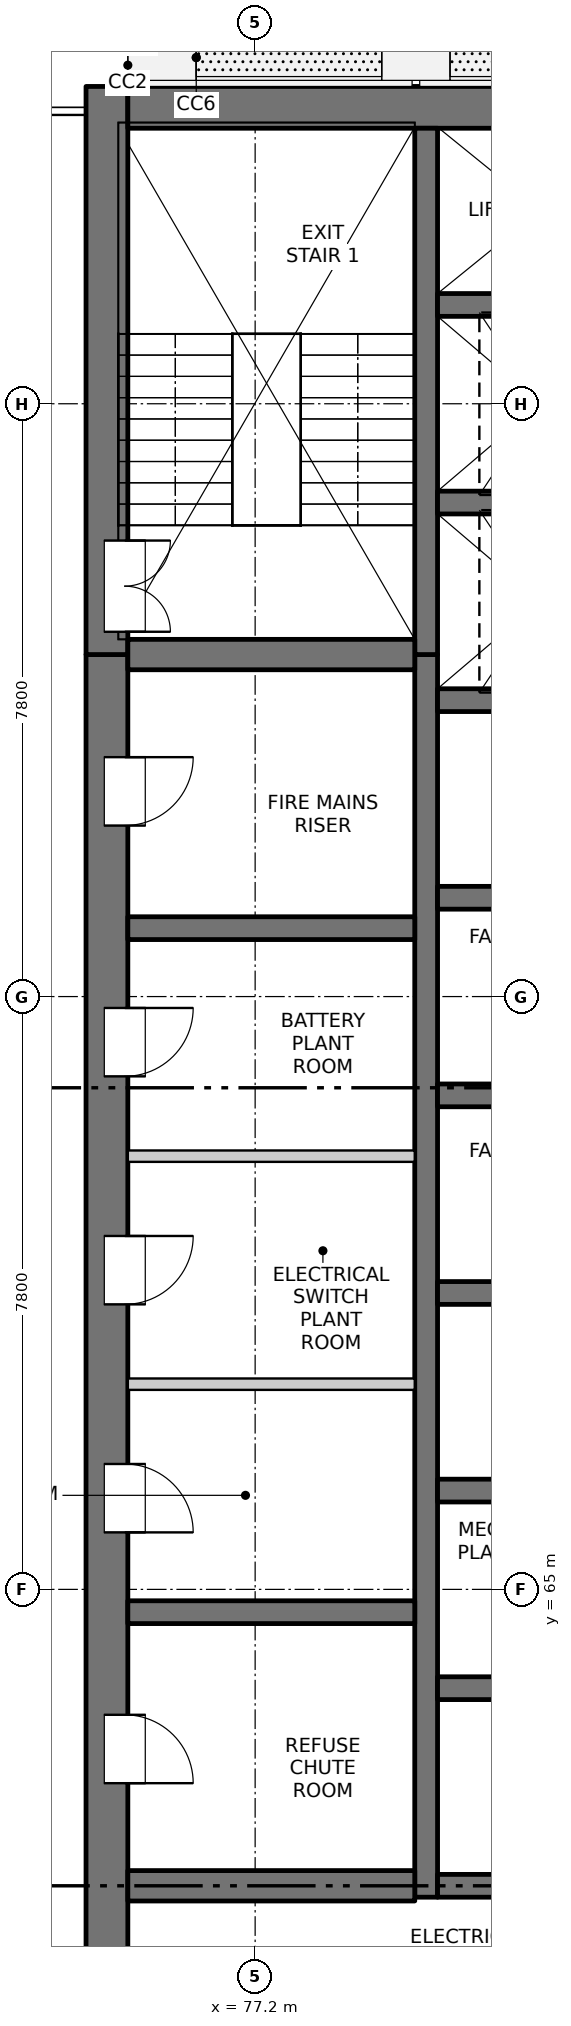
"""IFC4 building model, lengths in metres.
Left out: names, types, materials, properties, quantities, classifications, styles, units other than length and angle.
Written with IfcOpenShell. Run it as: python <this file> out.ifc"""

import sys

from ifc_helpers import new_model, si_unit, direction, frame, frame_2d, origin, place, context, subcontext, project, spatial, rectangle, extrude, element, fill, save


model = new_model("IFC4")
c1 = context("Model", 3, precision=1e-05, world=origin(), true_north=direction((0.0, 1.0)))
c2 = subcontext(c1, "Body", "Model", "MODEL_VIEW")
j1 = project(units=[si_unit("LENGTHUNIT", "METRE"), si_unit("PLANEANGLEUNIT", "RADIAN")], contexts=[c1])
p1 = place(None, origin())
s1 = spatial("IfcSite", under=j1, at=p1, CompositionType="ELEMENT")
p2 = place(p1, origin())
s2 = spatial("IfcBuilding", under=s1, at=p2, CompositionType="ELEMENT")
p3 = place(p2, frame((0.0, 0.0, 172.4)))
s3 = spatial("IfcBuildingStorey", under=s2, at=p3, CompositionType="ELEMENT", Elevation=172.4)
p4 = place(p3, frame((75.25, 54.975, -0.3), z_axis=(0.0, 0.0, 1.0), x_axis=(0.0, 1.0, 0.0)))
e1 = element("IfcWall", 1, at=p4, inside=s3, PredefinedType="SOLIDWALL", context=c2, shape_type="SweptSolid", body=[
    extrude(rectangle(XDim=22.325, YDim=0.55, at=frame_2d((11.163, 0.0))), origin(), (0.0, 0.0, 1.0), 6.8),
])
p5 = place(p4, frame((7.475, 0.0, 0.3)))
e2 = element("IfcOpeningElement", 2, at=p5, cuts=e1, PredefinedType="OPENING", context=c2, shape_type="SweptSolid", body=[
    extrude(rectangle(XDim=0.9, YDim=2.1, at=frame_2d((0.45, 1.05))), frame((0.0, 0.285, 0.0), z_axis=(0.0, -1.0, 0.0), x_axis=(1.0, 0.0, 0.0)), (0.0, 0.0, 1.0), 0.57),
])
p6 = place(p4, frame((10.775, 0.0, 0.3)))
e3 = element("IfcOpeningElement", 3, at=p6, cuts=e1, PredefinedType="OPENING", context=c2, shape_type="SweptSolid", body=[
    extrude(rectangle(XDim=0.9, YDim=2.1, at=frame_2d((0.45, 1.05))), frame((0.0, 0.285, 0.0), z_axis=(0.0, -1.0, 0.0), x_axis=(1.0, 0.0, 0.0)), (0.0, 0.0, 1.0), 0.57),
])
p7 = place(p4, frame((13.775, 0.0, 0.3)))
e4 = element("IfcOpeningElement", 4, at=p7, cuts=e1, PredefinedType="OPENING", context=c2, shape_type="SweptSolid", body=[
    extrude(rectangle(XDim=0.9, YDim=2.1, at=frame_2d((0.45, 1.05))), frame((0.0, 0.285, 0.0), z_axis=(0.0, -1.0, 0.0), x_axis=(1.0, 0.0, 0.0)), (0.0, 0.0, 1.0), 0.57),
])
p8 = place(p4, frame((16.775, 0.0, 0.3)))
e5 = element("IfcOpeningElement", 5, at=p8, cuts=e1, PredefinedType="OPENING", context=c2, shape_type="SweptSolid", body=[
    extrude(rectangle(XDim=0.9, YDim=2.1, at=frame_2d((0.45, 1.05))), frame((0.0, 0.285, 0.0), z_axis=(0.0, -1.0, 0.0), x_axis=(1.0, 0.0, 0.0)), (0.0, 0.0, 1.0), 0.57),
])
p9 = place(p4, frame((20.075, 0.0, 0.3)))
e6 = element("IfcOpeningElement", 6, at=p9, cuts=e1, PredefinedType="OPENING", context=c2, shape_type="SweptSolid", body=[
    extrude(rectangle(XDim=0.9, YDim=2.1, at=frame_2d((0.45, 1.05))), frame((0.0, 0.285, 0.0), z_axis=(0.0, -1.0, 0.0), x_axis=(1.0, 0.0, 0.0)), (0.0, 0.0, 1.0), 0.57),
])
p10 = place(p3, frame((75.25, 77.3, -0.3), z_axis=(0.0, 0.0, 1.0), x_axis=(0.0, 1.0, 0.0)))
e7 = element("IfcWall", 7, at=p10, inside=s3, PredefinedType="SOLIDWALL", context=c2, shape_type="SweptSolid", body=[
    extrude(rectangle(XDim=7.475, YDim=0.55, at=frame_2d((3.737, 0.0))), origin(), (0.0, 0.0, 1.0), 6.8),
])
p11 = place(p10, frame((0.3, 0.0, 0.3)))
e8 = element("IfcOpeningElement", 8, at=p11, cuts=e7, PredefinedType="OPENING", context=c2, shape_type="SweptSolid", body=[
    extrude(rectangle(XDim=1.2, YDim=2.1, at=frame_2d((0.6, 1.05))), frame((0.0, 0.285, 0.0), z_axis=(0.0, -1.0, 0.0), x_axis=(1.0, 0.0, 0.0)), (0.0, 0.0, 1.0), 0.57),
])
p12 = place(p3, frame((75.525, 84.5, -0.3), z_axis=(0.0, 0.0, 1.0), x_axis=(1.0, 0.0, 0.0)))
e9 = element("IfcWall", 9, at=p12, inside=s3, PredefinedType="SOLIDWALL", context=c2, shape_type="SweptSolid", body=[
    extrude(rectangle(XDim=18.95, YDim=0.55, at=frame_2d((9.475, 0.0))), origin(), (0.0, 0.0, 1.0), 6.8),
])
p13 = place(p3, frame((79.45, 60.95, -0.3), z_axis=(0.0, 0.0, 1.0), x_axis=(0.0, 1.0, 0.0)))
e10 = element("IfcWall", 10, at=p13, inside=s3, PredefinedType="SOLIDWALL", context=c2, shape_type="SweptSolid", body=[
    extrude(rectangle(XDim=16.35, YDim=0.3, at=frame_2d((8.175, 0.0))), origin(), (0.0, 0.0, 1.0), 6.8),
])
p14 = place(p3, frame((79.45, 77.3, -0.3), z_axis=(0.0, 0.0, 1.0), x_axis=(0.0, 1.0, 0.0)))
e11 = element("IfcWall", 11, at=p14, inside=s3, PredefinedType="SOLIDWALL", context=c2, shape_type="SweptSolid", body=[
    extrude(rectangle(XDim=6.925, YDim=0.3, at=frame_2d((3.462, 0.0))), origin(), (0.0, 0.0, 1.0), 6.8),
])
for number, where, z_axis, x_axis in (
    (12, (79.6, 61.1, -0.3), (0.0, 0.0, 1.0), (1.0, 0.0, 0.0)),
    (13, (79.6, 63.7, -0.3), (0.0, 0.0, 1.0), (1.0, 0.0, 0.0)),
    (14, (79.6, 66.3, -0.3), (0.0, 0.0, 1.0), (1.0, 0.0, 0.0)),
    (15, (79.6, 68.9, -0.3), (0.0, 0.0, 1.0), (1.0, 0.0, 0.0)),
    (16, (79.6, 71.5, -0.3), (0.0, 0.0, 1.0), (1.0, 0.0, 0.0)),
    (17, (79.6, 74.1, -0.3), (0.0, 0.0, 1.0), (1.0, 0.0, 0.0)),
    (18, (79.6, 76.7, -0.3), (0.0, 0.0, 1.0), (1.0, 0.0, 0.0)),
    (19, (79.6, 79.3, -0.3), (0.0, 0.0, 1.0), (1.0, 0.0, 0.0)),
    (20, (79.6, 81.9, -0.3), (0.0, 0.0, 1.0), (1.0, 0.0, 0.0)),
):
    element("IfcWall", number, at=place(p3, frame(where, z_axis=z_axis, x_axis=x_axis)), inside=s3, PredefinedType="SOLIDWALL", context=c2, shape_type="SweptSolid", body=[
        extrude(rectangle(XDim=3.0, YDim=0.3, at=frame_2d((1.5, 0.0))), origin(), (0.0, 0.0, 1.0), 6.8),
    ])
p15 = place(p3, frame((75.525, 61.1, -0.3), z_axis=(0.0, 0.0, 1.0), x_axis=(1.0, 0.0, 0.0)))
e21 = element("IfcWall", 21, at=p15, inside=s3, PredefinedType="SOLIDWALL", context=c2, shape_type="SweptSolid", body=[
    extrude(rectangle(XDim=3.775, YDim=0.4, at=frame_2d((1.888, 0.0))), origin(), (0.0, 0.0, 1.0), 6.8),
])
for number, where, z_axis, x_axis in (
    (22, (75.525, 64.7, -0.3), (0.0, 0.0, 1.0), (1.0, 0.0, 0.0)),
    (23, (75.525, 73.7, -0.3), (0.0, 0.0, 1.0), (1.0, 0.0, 0.0)),
):
    element("IfcWall", number, at=place(p3, frame(where, z_axis=z_axis, x_axis=x_axis)), inside=s3, PredefinedType="SOLIDWALL", context=c2, shape_type="SweptSolid", body=[
        extrude(rectangle(XDim=3.775, YDim=0.3, at=frame_2d((1.888, 0.0))), origin(), (0.0, 0.0, 1.0), 6.8),
    ])
p16 = place(p3, frame((75.525, 77.3, -0.3), z_axis=(0.0, 0.0, 1.0), x_axis=(1.0, 0.0, 0.0)))
e24 = element("IfcWall", 24, at=p16, inside=s3, PredefinedType="SOLIDWALL", context=c2, shape_type="SweptSolid", body=[
    extrude(rectangle(XDim=3.775, YDim=0.4, at=frame_2d((1.888, 0.0))), origin(), (0.0, 0.0, 1.0), 6.8),
])
for number, where, z_axis, x_axis in (
    (25, (75.525, 67.7, 0.0), (0.0, 0.0, 1.0), (1.0, 0.0, 0.0)),
    (26, (75.525, 70.7, 0.0), (0.0, 0.0, 1.0), (1.0, 0.0, 0.0)),
):
    element("IfcWall", number, at=place(p3, frame(where, z_axis=z_axis, x_axis=x_axis)), inside=s3, PredefinedType="PARTITIONING", context=c2, shape_type="SweptSolid", body=[
        extrude(rectangle(XDim=3.775, YDim=0.15, at=frame_2d((1.887, 0.0))), origin(), (0.0, 0.0, 1.0), 6.5),
    ])
p17 = place(p5, origin())
e27 = element("IfcDoor", 27, at=p17, inside=s3, OperationType="SINGLE_SWING_RIGHT", PredefinedType="DOOR", context=c2, shape_type="SweptSolid", body=[
    extrude(rectangle(XDim=0.9, YDim=2.1, at=frame_2d((0.45, 1.05))), frame((0.0, -0.21, 0.0), z_axis=(0.0, -1.0, 0.0), x_axis=(1.0, 0.0, 0.0)), (0.0, 0.0, 1.0), 0.05),
])
fill(e2, e27)
p18 = place(p6, origin())
e28 = element("IfcDoor", 28, at=p18, inside=s3, OperationType="SINGLE_SWING_RIGHT", PredefinedType="DOOR", context=c2, shape_type="SweptSolid", body=[
    extrude(rectangle(XDim=0.9, YDim=2.1, at=frame_2d((0.45, 1.05))), frame((0.0, -0.21, 0.0), z_axis=(0.0, -1.0, 0.0), x_axis=(1.0, 0.0, 0.0)), (0.0, 0.0, 1.0), 0.05),
])
fill(e3, e28)
p19 = place(p7, origin())
e29 = element("IfcDoor", 29, at=p19, inside=s3, OperationType="SINGLE_SWING_LEFT", PredefinedType="DOOR", context=c2, shape_type="SweptSolid", body=[
    extrude(rectangle(XDim=0.9, YDim=2.1, at=frame_2d((0.45, 1.05))), frame((0.0, -0.21, 0.0), z_axis=(0.0, -1.0, 0.0), x_axis=(1.0, 0.0, 0.0)), (0.0, 0.0, 1.0), 0.05),
])
fill(e4, e29)
p20 = place(p8, origin())
e30 = element("IfcDoor", 30, at=p20, inside=s3, OperationType="SINGLE_SWING_LEFT", PredefinedType="DOOR", context=c2, shape_type="SweptSolid", body=[
    extrude(rectangle(XDim=0.9, YDim=2.1, at=frame_2d((0.45, 1.05))), frame((0.0, -0.21, 0.0), z_axis=(0.0, -1.0, 0.0), x_axis=(1.0, 0.0, 0.0)), (0.0, 0.0, 1.0), 0.05),
])
fill(e5, e30)
p21 = place(p9, origin())
e31 = element("IfcDoor", 31, at=p21, inside=s3, OperationType="SINGLE_SWING_LEFT", PredefinedType="DOOR", context=c2, shape_type="SweptSolid", body=[
    extrude(rectangle(XDim=0.9, YDim=2.1, at=frame_2d((0.45, 1.05))), frame((0.0, -0.21, 0.0), z_axis=(0.0, -1.0, 0.0), x_axis=(1.0, 0.0, 0.0)), (0.0, 0.0, 1.0), 0.05),
])
fill(e6, e31)
p22 = place(p11, origin())
e32 = element("IfcDoor", 32, at=p22, inside=s3, OperationType="DOUBLE_DOOR_SINGLE_SWING", PredefinedType="DOOR", context=c2, shape_type="SweptSolid", body=[
    extrude(rectangle(XDim=1.2, YDim=2.1, at=frame_2d((0.6, 1.05))), frame((0.0, -0.21, 0.0), z_axis=(0.0, -1.0, 0.0), x_axis=(1.0, 0.0, 0.0)), (0.0, 0.0, 1.0), 0.05),
])
fill(e8, e32)
save(model, sys.argv[1])
